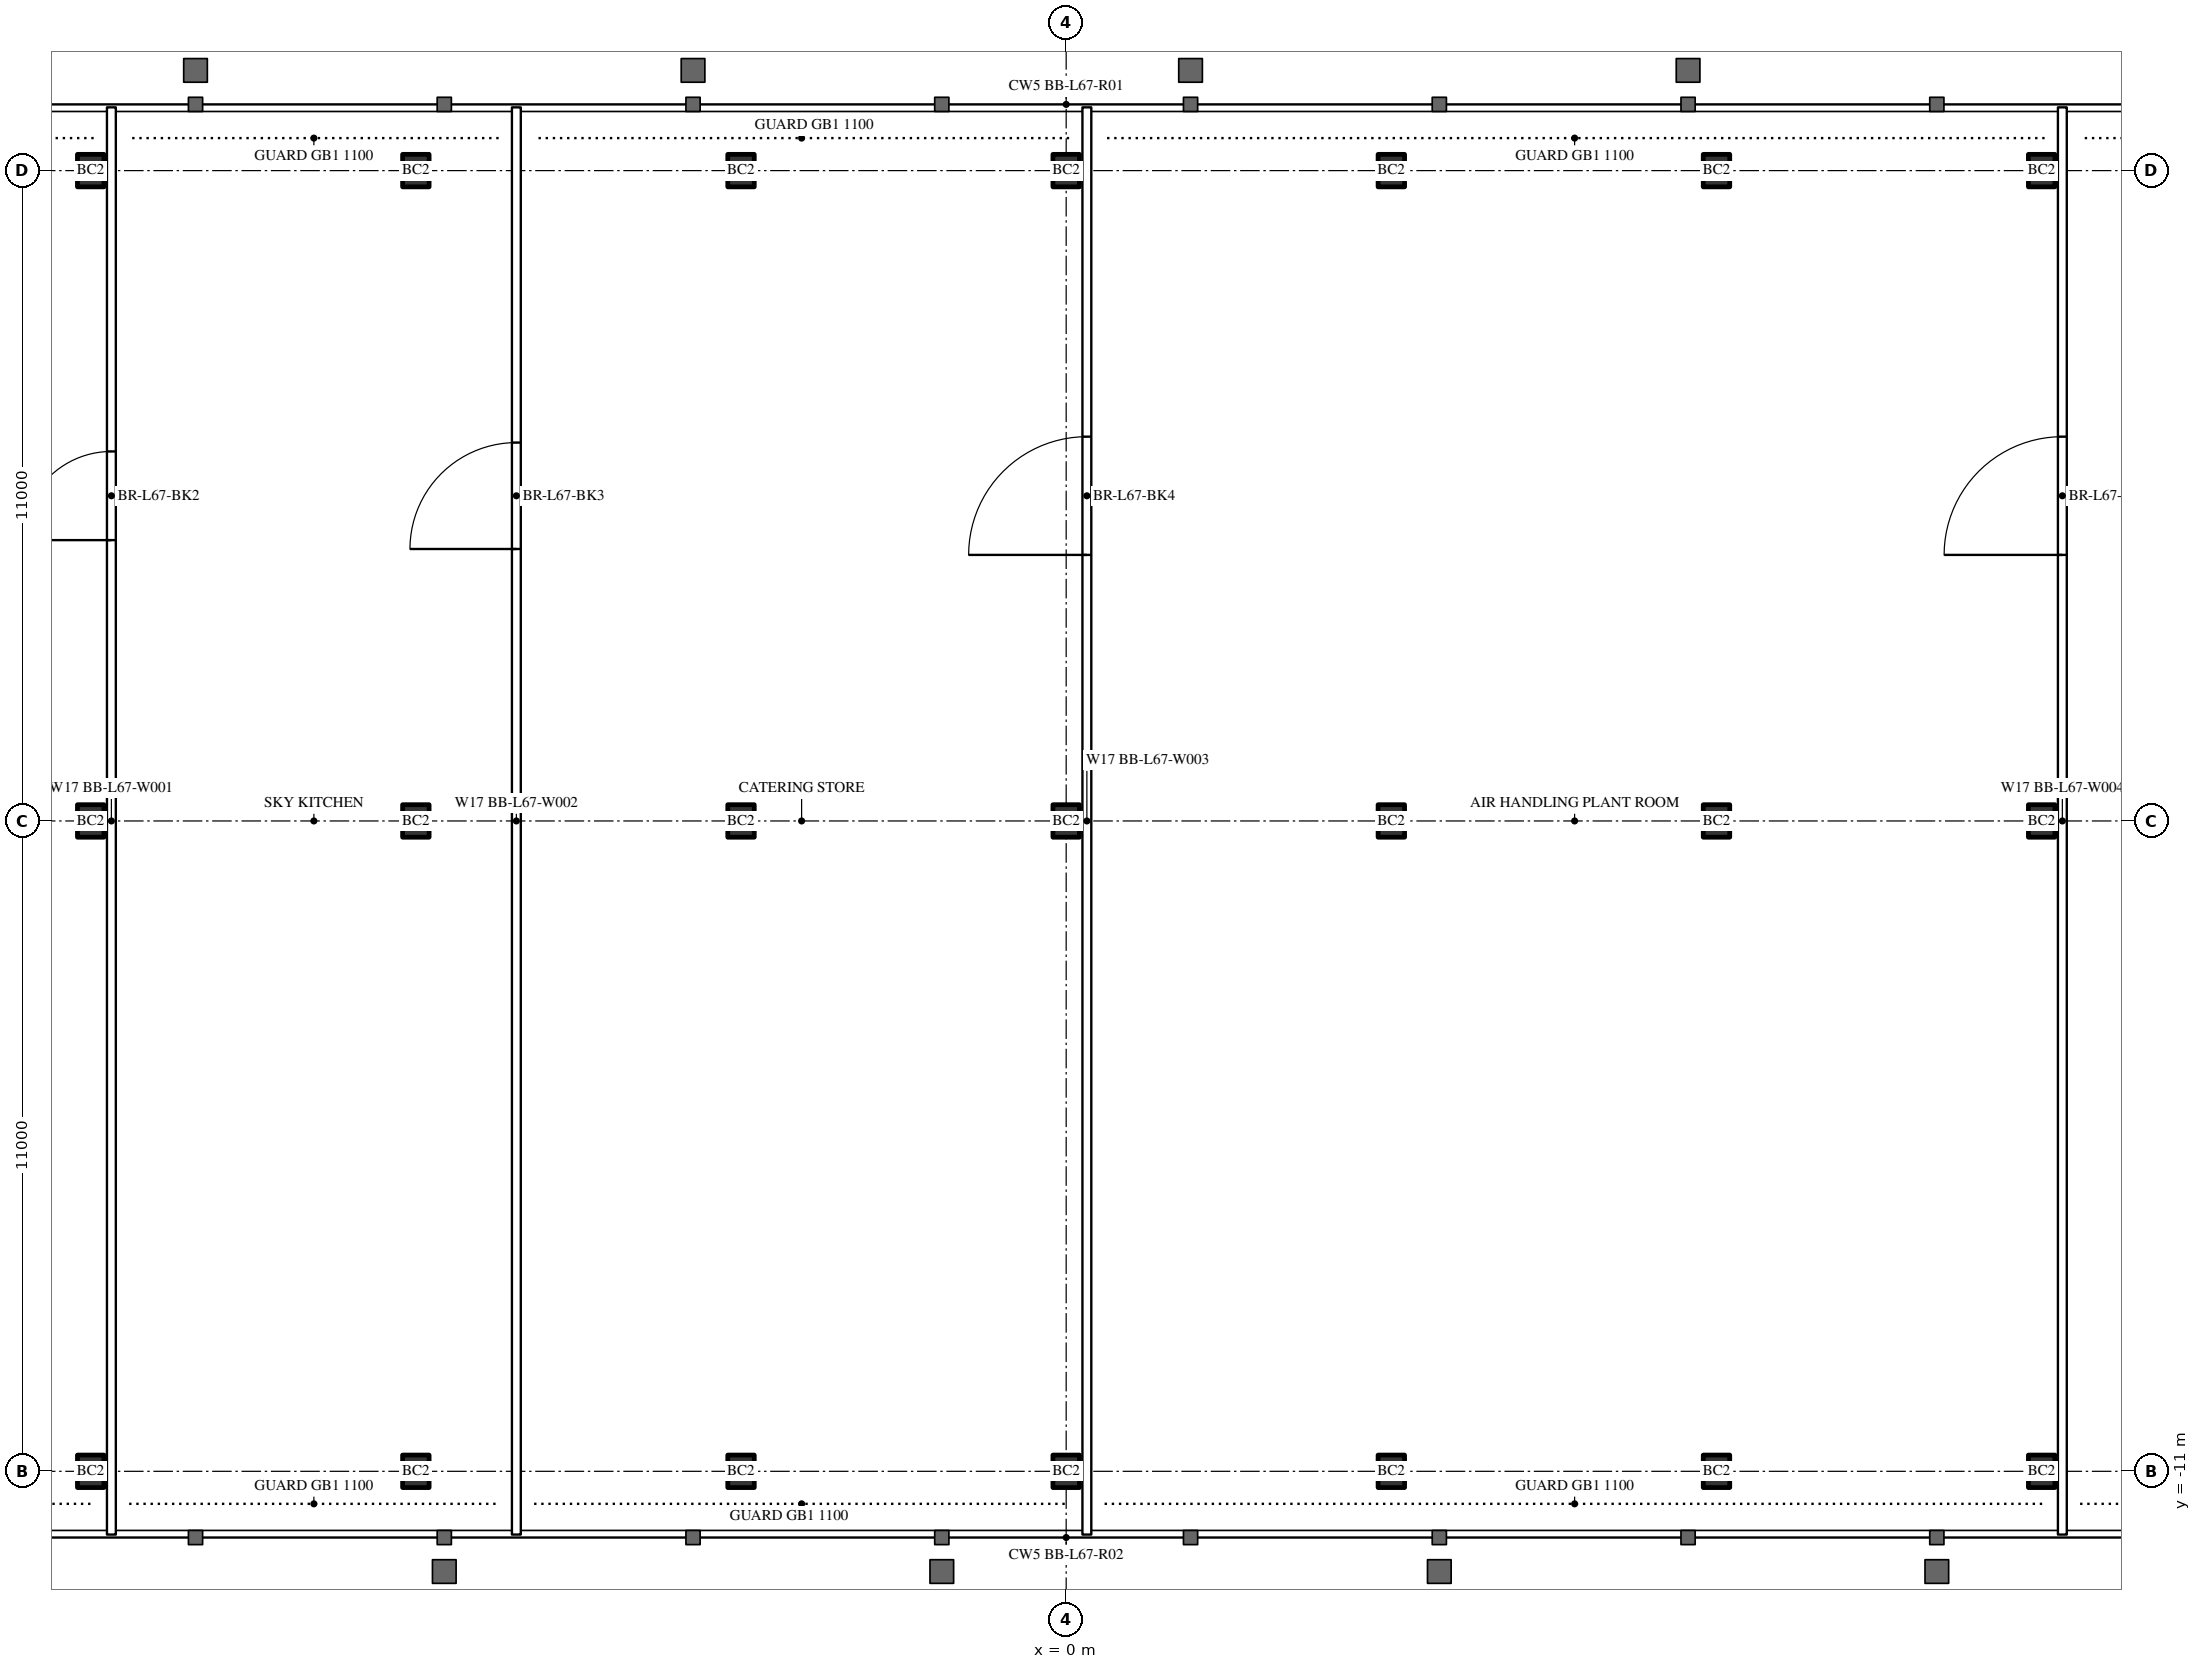
"""IFC4 building model, lengths in metres.
Left out: names, types, materials, properties, quantities, classifications, styles, units other than length and angle.
Written with IfcOpenShell. Run it as: python <this file> out.ifc"""

import sys

from ifc_helpers import new_model, si_unit, direction, frame, frame_2d, origin, origin_2d, place, context, subcontext, project, spatial, rectangle, i_section, extrude, element, fill, save


model = new_model("IFC4")
c1 = context("Model", 3, precision=1e-05, world=origin(), true_north=direction((0.0, 1.0)))
c2 = subcontext(c1, "Body", "Model", "MODEL_VIEW")
j1 = project(units=[si_unit("LENGTHUNIT", "METRE"), si_unit("PLANEANGLEUNIT", "RADIAN")], contexts=[c1])
p1 = place(None, origin())
s1 = spatial("IfcSite", under=j1, at=p1, CompositionType="ELEMENT")
p2 = place(p1, origin())
s2 = spatial("IfcBuilding", under=s1, at=p2, CompositionType="ELEMENT")
p3 = place(p2, frame((0.0, 0.0, 251.9)))
s3 = spatial("IfcBuildingStorey", under=s2, at=p3, CompositionType="ELEMENT", Elevation=251.9)
for number, where, z_axis, x_axis in (
    (1, (-16.5, -11.0, 0.0), (0.0, 0.0, 1.0), (1.0, 0.0, 0.0)),
    (2, (-11.0, -11.0, 0.0), (0.0, 0.0, 1.0), (1.0, 0.0, 0.0)),
    (3, (-5.5, -11.0, 0.0), (0.0, 0.0, 1.0), (1.0, 0.0, 0.0)),
    (4, (0.0, -11.0, 0.0), (0.0, 0.0, 1.0), (1.0, 0.0, 0.0)),
    (5, (5.5, -11.0, 0.0), (0.0, 0.0, 1.0), (1.0, 0.0, 0.0)),
    (6, (11.0, -11.0, 0.0), (0.0, 0.0, 1.0), (1.0, 0.0, 0.0)),
    (7, (16.5, -11.0, 0.0), (0.0, 0.0, 1.0), (1.0, 0.0, 0.0)),
    (8, (-16.5, 0.0, 0.0), (0.0, 0.0, 1.0), (1.0, 0.0, 0.0)),
    (9, (-11.0, 0.0, 0.0), (0.0, 0.0, 1.0), (1.0, 0.0, 0.0)),
    (10, (-5.5, 0.0, 0.0), (0.0, 0.0, 1.0), (1.0, 0.0, 0.0)),
    (11, (0.0, 0.0, 0.0), (0.0, 0.0, 1.0), (1.0, 0.0, 0.0)),
    (12, (5.5, 0.0, 0.0), (0.0, 0.0, 1.0), (1.0, 0.0, 0.0)),
    (13, (11.0, 0.0, 0.0), (0.0, 0.0, 1.0), (1.0, 0.0, 0.0)),
    (14, (16.5, 0.0, 0.0), (0.0, 0.0, 1.0), (1.0, 0.0, 0.0)),
    (15, (-16.5, 11.0, 0.0), (0.0, 0.0, 1.0), (1.0, 0.0, 0.0)),
    (16, (-11.0, 11.0, 0.0), (0.0, 0.0, 1.0), (1.0, 0.0, 0.0)),
    (17, (-5.5, 11.0, 0.0), (0.0, 0.0, 1.0), (1.0, 0.0, 0.0)),
    (18, (0.0, 11.0, 0.0), (0.0, 0.0, 1.0), (1.0, 0.0, 0.0)),
    (19, (5.5, 11.0, 0.0), (0.0, 0.0, 1.0), (1.0, 0.0, 0.0)),
    (20, (11.0, 11.0, 0.0), (0.0, 0.0, 1.0), (1.0, 0.0, 0.0)),
    (21, (16.5, 11.0, 0.0), (0.0, 0.0, 1.0), (1.0, 0.0, 0.0)),
):
    element("IfcColumn", number, at=place(p3, frame(where, z_axis=z_axis, x_axis=x_axis)), inside=s3, PredefinedType="COLUMN", context=c2, shape_type="SweptSolid", body=[
        extrude(i_section(OverallWidth=0.448, OverallDepth=0.55, WebThickness=0.072, FlangeThickness=0.115, FilletRadius=0.02, at=origin_2d()), origin(), (0.0, 0.0, 1.0), 5.4),
    ])
p4 = place(p3, frame((-16.15, -12.07, 0.0), z_axis=(0.0, 0.0, 1.0), x_axis=(0.0, 1.0, 0.0)))
e22 = element("IfcWall", 22, at=p4, inside=s3, PredefinedType="PARTITIONING", context=c2, shape_type="SweptSolid", body=[
    extrude(rectangle(XDim=24.14, YDim=0.15, at=frame_2d((12.07, 0.0))), origin(), (0.0, 0.0, 1.0), 5.2),
])
p5 = place(p4, frame((16.82, 0.0, 0.0)))
e23 = element("IfcOpeningElement", 23, at=p5, cuts=e22, PredefinedType="OPENING", context=c2, shape_type="SweptSolid", body=[
    extrude(rectangle(XDim=1.5, YDim=2.2, at=frame_2d((0.75, 1.1))), frame((0.0, 0.085, 0.0), z_axis=(0.0, -1.0, 0.0), x_axis=(1.0, 0.0, 0.0)), (0.0, 0.0, 1.0), 0.17),
])
p6 = place(p3, frame((-9.3, -12.07, 0.0), z_axis=(0.0, 0.0, 1.0), x_axis=(0.0, 1.0, 0.0)))
e24 = element("IfcWall", 24, at=p6, inside=s3, PredefinedType="PARTITIONING", context=c2, shape_type="SweptSolid", body=[
    extrude(rectangle(XDim=24.14, YDim=0.15, at=frame_2d((12.07, 0.0))), origin(), (0.0, 0.0, 1.0), 5.2),
])
p7 = place(p6, frame((16.67, 0.0, 0.0)))
e25 = element("IfcOpeningElement", 25, at=p7, cuts=e24, PredefinedType="OPENING", context=c2, shape_type="SweptSolid", body=[
    extrude(rectangle(XDim=1.8, YDim=2.2, at=frame_2d((0.9, 1.1))), frame((0.0, 0.085, 0.0), z_axis=(0.0, -1.0, 0.0), x_axis=(1.0, 0.0, 0.0)), (0.0, 0.0, 1.0), 0.17),
])
p8 = place(p3, frame((0.35, -12.07, 0.0), z_axis=(0.0, 0.0, 1.0), x_axis=(0.0, 1.0, 0.0)))
e26 = element("IfcWall", 26, at=p8, inside=s3, PredefinedType="PARTITIONING", context=c2, shape_type="SweptSolid", body=[
    extrude(rectangle(XDim=24.14, YDim=0.15, at=frame_2d((12.07, 0.0))), origin(), (0.0, 0.0, 1.0), 5.2),
])
p9 = place(p8, frame((16.57, 0.0, 0.0)))
e27 = element("IfcOpeningElement", 27, at=p9, cuts=e26, PredefinedType="OPENING", context=c2, shape_type="SweptSolid", body=[
    extrude(rectangle(XDim=2.0, YDim=2.4, at=frame_2d((1.0, 1.2))), frame((0.0, 0.085, 0.0), z_axis=(0.0, -1.0, 0.0), x_axis=(1.0, 0.0, 0.0)), (0.0, 0.0, 1.0), 0.17),
])
p10 = place(p3, frame((16.85, -12.07, 0.0), z_axis=(0.0, 0.0, 1.0), x_axis=(0.0, 1.0, 0.0)))
e28 = element("IfcWall", 28, at=p10, inside=s3, PredefinedType="PARTITIONING", context=c2, shape_type="SweptSolid", body=[
    extrude(rectangle(XDim=24.14, YDim=0.15, at=frame_2d((12.07, 0.0))), origin(), (0.0, 0.0, 1.0), 5.2),
])
p11 = place(p10, frame((16.57, 0.0, 0.0)))
e29 = element("IfcOpeningElement", 29, at=p11, cuts=e28, PredefinedType="OPENING", context=c2, shape_type="SweptSolid", body=[
    extrude(rectangle(XDim=2.0, YDim=2.4, at=frame_2d((1.0, 1.2))), frame((0.0, 0.085, 0.0), z_axis=(0.0, -1.0, 0.0), x_axis=(1.0, 0.0, 0.0)), (0.0, 0.0, 1.0), 0.17),
])
p12 = place(p5, origin())
e30 = element("IfcDoor", 30, at=p12, inside=s3, OperationType="DOUBLE_SWING_LEFT", PredefinedType="DOOR", context=c2, shape_type="SweptSolid", body=[
    extrude(rectangle(XDim=1.5, YDim=2.2, at=frame_2d((0.75, 1.1))), frame((0.0, 0.025, 0.0), z_axis=(0.0, -1.0, 0.0), x_axis=(1.0, 0.0, 0.0)), (0.0, 0.0, 1.0), 0.05),
])
fill(e23, e30)
p13 = place(p7, origin())
e31 = element("IfcDoor", 31, at=p13, inside=s3, OperationType="DOUBLE_DOOR_SINGLE_SWING", PredefinedType="DOOR", context=c2, shape_type="SweptSolid", body=[
    extrude(rectangle(XDim=1.8, YDim=2.2, at=frame_2d((0.9, 1.1))), frame((0.0, 0.025, 0.0), z_axis=(0.0, -1.0, 0.0), x_axis=(1.0, 0.0, 0.0)), (0.0, 0.0, 1.0), 0.05),
])
fill(e25, e31)
p14 = place(p9, origin())
e32 = element("IfcDoor", 32, at=p14, inside=s3, OperationType="DOUBLE_DOOR_SINGLE_SWING", PredefinedType="DOOR", context=c2, shape_type="SweptSolid", body=[
    extrude(rectangle(XDim=2.0, YDim=2.4, at=frame_2d((1.0, 1.2))), frame((0.0, 0.025, 0.0), z_axis=(0.0, -1.0, 0.0), x_axis=(1.0, 0.0, 0.0)), (0.0, 0.0, 1.0), 0.05),
])
fill(e27, e32)
p15 = place(p11, origin())
e33 = element("IfcDoor", 33, at=p15, inside=s3, OperationType="DOUBLE_DOOR_SINGLE_SWING", PredefinedType="DOOR", context=c2, shape_type="SweptSolid", body=[
    extrude(rectangle(XDim=2.0, YDim=2.4, at=frame_2d((1.0, 1.2))), frame((0.0, 0.025, 0.0), z_axis=(0.0, -1.0, 0.0), x_axis=(1.0, 0.0, 0.0)), (0.0, 0.0, 1.0), 0.05),
])
fill(e29, e33)
save(model, sys.argv[1])
